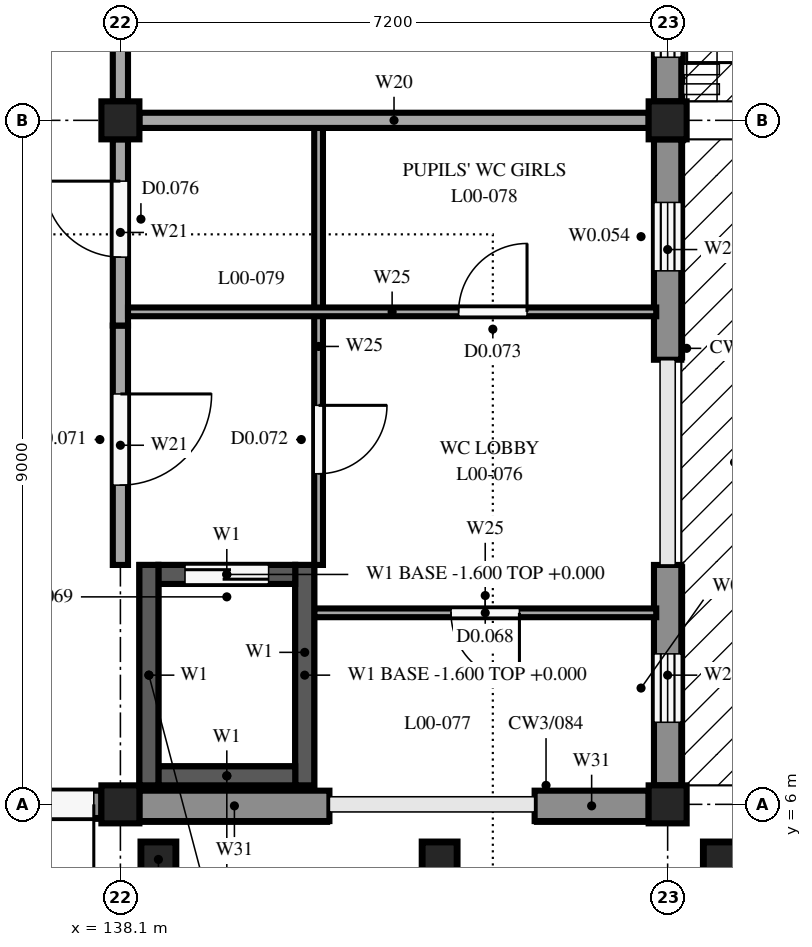
"""IFC4 building model, lengths in metres.
Left out: names, types, materials, properties, quantities, classifications, styles, units other than length and angle.
Written with IfcOpenShell. Run it as: python <this file> out.ifc"""

import sys

from ifc_helpers import new_model, si_unit, direction, frame, frame_2d, origin, origin_2d, place, context, subcontext, project, spatial, rectangle, extrude, element, fill, save


model = new_model("IFC4")
c1 = context("Model", 3, precision=1e-05, world=origin(), true_north=direction((0.0, 1.0)))
c2 = subcontext(c1, "Body", "Model", "MODEL_VIEW")
j1 = project(units=[si_unit("LENGTHUNIT", "METRE"), si_unit("PLANEANGLEUNIT", "RADIAN")], contexts=[c1])
p1 = place(None, origin())
s1 = spatial("IfcSite", under=j1, at=p1, CompositionType="ELEMENT")
p2 = place(p1, origin())
s2 = spatial("IfcBuilding", under=s1, at=p2, CompositionType="ELEMENT")
p3 = place(p2, origin())
s3 = spatial("IfcBuildingStorey", under=s2, at=p3, CompositionType="ELEMENT", Elevation=0.0)
for number, where, z_axis, x_axis in (
    (1, (138.1, 6.0, 0.0), (0.0, 0.0, 1.0), (1.0, 0.0, 0.0)),
    (2, (138.1, 15.0, 0.0), (0.0, 0.0, 1.0), (1.0, 0.0, 0.0)),
    (3, (145.3, 6.0, 0.0), (0.0, 0.0, 1.0), (1.0, 0.0, 0.0)),
    (4, (145.3, 15.0, 0.0), (0.0, 0.0, 1.0), (1.0, 0.0, 0.0)),
):
    element("IfcColumn", number, at=place(p3, frame(where, z_axis=z_axis, x_axis=x_axis)), inside=s3, PredefinedType="COLUMN", context=c2, shape_type="SweptSolid", body=[
        extrude(rectangle(XDim=0.5, YDim=0.5, at=origin_2d()), origin(), (0.0, 0.0, 1.0), 4.25),
    ])
for number, where, z_axis, x_axis in (
    (5, (138.475, 6.25, 0.0), (0.0, 0.0, 1.0), (0.0, 1.0, 0.0)),
    (6, (140.525, 6.25, 0.0), (0.0, 0.0, 1.0), (0.0, 1.0, 0.0)),
):
    element("IfcWall", number, at=place(p3, frame(where, z_axis=z_axis, x_axis=x_axis)), inside=s3, PredefinedType="SHEAR", context=c2, shape_type="SweptSolid", body=[
        extrude(rectangle(XDim=2.9, YDim=0.25, at=frame_2d((1.45, 0.0))), origin(), (0.0, 0.0, 1.0), 4.25),
    ])
p4 = place(p3, frame((138.6, 6.375, 0.0), z_axis=(0.0, 0.0, 1.0), x_axis=(1.0, 0.0, 0.0)))
e7 = element("IfcWall", 7, at=p4, inside=s3, PredefinedType="SHEAR", context=c2, shape_type="SweptSolid", body=[
    extrude(rectangle(XDim=1.8, YDim=0.25, at=frame_2d((0.9, 0.0))), origin(), (0.0, 0.0, 1.0), 4.25),
])
p5 = place(p3, frame((138.6, 9.025, 0.0), z_axis=(0.0, 0.0, 1.0), x_axis=(1.0, 0.0, 0.0)))
e8 = element("IfcWall", 8, at=p5, inside=s3, PredefinedType="SHEAR", context=c2, shape_type="SweptSolid", body=[
    extrude(rectangle(XDim=1.8, YDim=0.25, at=frame_2d((0.9, 0.0))), origin(), (0.0, 0.0, 1.0), 4.25),
])
p6 = place(p5, frame((0.35, 0.0, 0.0)))
e9 = element("IfcOpeningElement", 9, at=p6, cuts=e8, PredefinedType="OPENING", context=c2, shape_type="SweptSolid", body=[
    extrude(rectangle(XDim=1.1, YDim=2.1, at=frame_2d((0.55, 1.05))), frame((0.0, 0.135, 0.0), z_axis=(0.0, -1.0, 0.0), x_axis=(1.0, 0.0, 0.0)), (0.0, 0.0, 1.0), 0.27),
])
for number, where, z_axis, x_axis in (
    (10, (138.475, 6.25, -1.6), (0.0, 0.0, 1.0), (0.0, 1.0, 0.0)),
    (11, (140.525, 6.25, -1.6), (0.0, 0.0, 1.0), (0.0, 1.0, 0.0)),
):
    element("IfcWall", number, at=place(p3, frame(where, z_axis=z_axis, x_axis=x_axis)), inside=s3, PredefinedType="SHEAR", context=c2, shape_type="SweptSolid", body=[
        extrude(rectangle(XDim=2.9, YDim=0.25, at=frame_2d((1.45, 0.0))), origin(), (0.0, 0.0, 1.0), 1.6),
    ])
for number, where, z_axis, x_axis in (
    (12, (138.6, 6.375, -1.6), (0.0, 0.0, 1.0), (1.0, 0.0, 0.0)),
    (13, (138.6, 9.025, -1.6), (0.0, 0.0, 1.0), (1.0, 0.0, 0.0)),
):
    element("IfcWall", number, at=place(p3, frame(where, z_axis=z_axis, x_axis=x_axis)), inside=s3, PredefinedType="SHEAR", context=c2, shape_type="SweptSolid", body=[
        extrude(rectangle(XDim=1.8, YDim=0.25, at=frame_2d((0.9, 0.0))), origin(), (0.0, 0.0, 1.0), 1.6),
    ])
for number, where, z_axis, x_axis in (
    (14, (138.6, 5.275, -0.3), (0.0, 0.0, 1.0), (1.0, 0.0, 0.0)),
    (15, (142.3, 5.275, -0.3), (0.0, 0.0, 1.0), (1.0, 0.0, 0.0)),
    (16, (146.0, 5.275, -0.3), (0.0, 0.0, 1.0), (1.0, 0.0, 0.0)),
):
    element("IfcColumn", number, at=place(p3, frame(where, z_axis=z_axis, x_axis=x_axis)), inside=s3, PredefinedType="COLUMN", context=c2, shape_type="SweptSolid", body=[
        extrude(rectangle(XDim=0.45, YDim=0.45, at=origin_2d()), origin(), (0.0, 0.0, 1.0), 3.95),
    ])
p7 = place(p3, frame((145.3, 9.15, 0.0), z_axis=(0.0, 0.0, 1.0), x_axis=(0.0, -1.0, 0.0)))
e17 = element("IfcWall", 17, at=p7, inside=s3, PredefinedType="STANDARD", context=c2, shape_type="SweptSolid", body=[
    extrude(rectangle(XDim=2.9, YDim=0.36, at=frame_2d((1.45, 0.0))), origin(), (0.0, 0.0, 1.0), 3.75),
])
p8 = place(p7, frame((1.17, 0.0, 1.6)))
e18 = element("IfcOpeningElement", 18, at=p8, cuts=e17, PredefinedType="OPENING", context=c2, shape_type="SweptSolid", body=[
    extrude(rectangle(XDim=0.9, YDim=1.0, at=frame_2d((0.45, 0.5))), frame((0.0, 0.19, 0.0), z_axis=(0.0, -1.0, 0.0), x_axis=(1.0, 0.0, 0.0)), (0.0, 0.0, 1.0), 0.38),
])
p9 = place(p3, frame((145.3, 14.75, 0.0), z_axis=(0.0, 0.0, 1.0), x_axis=(0.0, -1.0, 0.0)))
e19 = element("IfcWall", 19, at=p9, inside=s3, PredefinedType="STANDARD", context=c2, shape_type="SweptSolid", body=[
    extrude(rectangle(XDim=2.9, YDim=0.36, at=frame_2d((1.45, 0.0))), origin(), (0.0, 0.0, 1.0), 3.75),
])
p10 = place(p9, frame((0.83, 0.0, 1.6)))
e20 = element("IfcOpeningElement", 20, at=p10, cuts=e19, PredefinedType="OPENING", context=c2, shape_type="SweptSolid", body=[
    extrude(rectangle(XDim=0.9, YDim=1.0, at=frame_2d((0.45, 0.5))), frame((0.0, 0.19, 0.0), z_axis=(0.0, -1.0, 0.0), x_axis=(1.0, 0.0, 0.0)), (0.0, 0.0, 1.0), 0.38),
])
p11 = place(p3, frame((145.3, 23.75, 0.0), z_axis=(0.0, 0.0, 1.0), x_axis=(0.0, -1.0, 0.0)))
e21 = element("IfcWall", 21, at=p11, inside=s3, PredefinedType="STANDARD", context=c2, shape_type="SweptSolid", body=[
    extrude(rectangle(XDim=8.5, YDim=0.36, at=frame_2d((4.25, 0.0))), origin(), (0.0, 0.0, 1.0), 3.75),
])
p12 = place(p11, frame((6.52, 0.0, 0.9)))
e22 = element("IfcOpeningElement", 22, at=p12, cuts=e21, PredefinedType="OPENING", context=c2, shape_type="SweptSolid", body=[
    extrude(rectangle(XDim=1.4, YDim=2.7, at=frame_2d((0.7, 1.35))), frame((0.0, 0.19, 0.0), z_axis=(0.0, -1.0, 0.0), x_axis=(1.0, 0.0, 0.0)), (0.0, 0.0, 1.0), 0.38),
])
p13 = place(p11, frame((4.54, 0.0, 0.9)))
e23 = element("IfcOpeningElement", 23, at=p13, cuts=e21, PredefinedType="OPENING", context=c2, shape_type="SweptSolid", body=[
    extrude(rectangle(XDim=1.4, YDim=2.7, at=frame_2d((0.7, 1.35))), frame((0.0, 0.19, 0.0), z_axis=(0.0, -1.0, 0.0), x_axis=(1.0, 0.0, 0.0)), (0.0, 0.0, 1.0), 0.38),
])
p14 = place(p11, frame((2.56, 0.0, 0.9)))
e24 = element("IfcOpeningElement", 24, at=p14, cuts=e21, PredefinedType="OPENING", context=c2, shape_type="SweptSolid", body=[
    extrude(rectangle(XDim=1.4, YDim=2.7, at=frame_2d((0.7, 1.35))), frame((0.0, 0.19, 0.0), z_axis=(0.0, -1.0, 0.0), x_axis=(1.0, 0.0, 0.0)), (0.0, 0.0, 1.0), 0.38),
])
p15 = place(p11, frame((0.58, 0.0, 0.9)))
e25 = element("IfcOpeningElement", 25, at=p15, cuts=e21, PredefinedType="OPENING", context=c2, shape_type="SweptSolid", body=[
    extrude(rectangle(XDim=1.4, YDim=2.7, at=frame_2d((0.7, 1.35))), frame((0.0, 0.19, 0.0), z_axis=(0.0, -1.0, 0.0), x_axis=(1.0, 0.0, 0.0)), (0.0, 0.0, 1.0), 0.38),
])
p16 = place(p3, frame((137.85, 6.0, 0.0), z_axis=(0.0, 0.0, 1.0), x_axis=(-1.0, 0.0, 0.0)))
e26 = element("IfcWall", 26, at=p16, inside=s3, PredefinedType="STANDARD", context=c2, shape_type="SweptSolid", body=[
    extrude(rectangle(XDim=2.2, YDim=0.36, at=frame_2d((1.1, 0.0))), origin(), (0.0, 0.0, 1.0), 3.9),
])
p17 = place(p16, frame((0.1, 0.0, 0.0)))
e27 = element("IfcOpeningElement", 27, at=p17, cuts=e26, PredefinedType="OPENING", context=c2, shape_type="SweptSolid", body=[
    extrude(rectangle(XDim=2.0, YDim=2.4, at=frame_2d((1.0, 1.2))), frame((0.0, 0.19, 0.0), z_axis=(0.0, -1.0, 0.0), x_axis=(1.0, 0.0, 0.0)), (0.0, 0.0, 1.0), 0.38),
])
p18 = place(p3, frame((140.85, 5.98, 0.0), z_axis=(0.0, 0.0, 1.0), x_axis=(-1.0, 0.0, 0.0)))
e28 = element("IfcWall", 28, at=p18, inside=s3, PredefinedType="STANDARD", context=c2, shape_type="SweptSolid", body=[
    extrude(rectangle(XDim=2.5, YDim=0.4, at=frame_2d((1.25, 0.0))), origin(), (0.0, 0.0, 1.0), 3.8),
])
p19 = place(p3, frame((145.05, 5.98, 0.0), z_axis=(0.0, 0.0, 1.0), x_axis=(-1.0, 0.0, 0.0)))
e29 = element("IfcWall", 29, at=p19, inside=s3, PredefinedType="STANDARD", context=c2, shape_type="SweptSolid", body=[
    extrude(rectangle(XDim=1.5, YDim=0.4, at=frame_2d((0.75, 0.0))), origin(), (0.0, 0.0, 1.0), 3.8),
])
p20 = place(p3, frame((138.1, 12.3, 0.0), z_axis=(0.0, 0.0, 1.0), x_axis=(0.0, -1.0, 0.0)))
e30 = element("IfcWall", 30, at=p20, inside=s3, PredefinedType="PARTITIONING", context=c2, shape_type="SweptSolid", body=[
    extrude(rectangle(XDim=3.15, YDim=0.2, at=frame_2d((1.575, 0.0))), origin(), (0.0, 0.0, 1.0), 3.8),
])
p21 = place(p20, frame((0.9, 0.0, 0.0)))
e31 = element("IfcOpeningElement", 31, at=p21, cuts=e30, PredefinedType="OPENING", context=c2, shape_type="SweptSolid", body=[
    extrude(rectangle(XDim=1.2, YDim=2.1, at=frame_2d((0.6, 1.05))), frame((0.0, 0.11, 0.0), z_axis=(0.0, -1.0, 0.0), x_axis=(1.0, 0.0, 0.0)), (0.0, 0.0, 1.0), 0.22),
])
p22 = place(p3, frame((138.1, 12.3, 0.0), z_axis=(0.0, 0.0, 1.0), x_axis=(0.0, 1.0, 0.0)))
e32 = element("IfcWall", 32, at=p22, inside=s3, PredefinedType="PARTITIONING", context=c2, shape_type="SweptSolid", body=[
    extrude(rectangle(XDim=2.45, YDim=0.2, at=frame_2d((1.225, 0.0))), origin(), (0.0, 0.0, 1.0), 3.8),
])
p23 = place(p22, frame((0.9, 0.0, 0.0)))
e33 = element("IfcOpeningElement", 33, at=p23, cuts=e32, PredefinedType="OPENING", context=c2, shape_type="SweptSolid", body=[
    extrude(rectangle(XDim=1.0, YDim=2.1, at=frame_2d((0.5, 1.05))), frame((0.0, 0.11, 0.0), z_axis=(0.0, -1.0, 0.0), x_axis=(1.0, 0.0, 0.0)), (0.0, 0.0, 1.0), 0.22),
])
p24 = place(p3, frame((138.35, 15.0, 0.0), z_axis=(0.0, 0.0, 1.0), x_axis=(1.0, 0.0, 0.0)))
e34 = element("IfcWall", 34, at=p24, inside=s3, PredefinedType="PARTITIONING", context=c2, shape_type="SweptSolid", body=[
    extrude(rectangle(XDim=6.7, YDim=0.2, at=frame_2d((3.35, 0.0))), origin(), (0.0, 0.0, 1.0), 3.8),
])
p25 = place(p3, frame((140.708, 14.9, 0.0), z_axis=(0.0, 0.0, 1.0), x_axis=(0.0, -1.0, 0.0)))
e35 = element("IfcWall", 35, at=p25, inside=s3, PredefinedType="PARTITIONING", context=c2, shape_type="SweptSolid", body=[
    extrude(rectangle(XDim=5.75, YDim=0.115, at=frame_2d((2.875, 0.0))), origin(), (0.0, 0.0, 1.0), 4.25),
])
p26 = place(p25, frame((3.65, 0.0, 0.0)))
e36 = element("IfcOpeningElement", 36, at=p26, cuts=e35, PredefinedType="OPENING", context=c2, shape_type="SweptSolid", body=[
    extrude(rectangle(XDim=0.9, YDim=2.1, at=frame_2d((0.45, 1.05))), frame((0.0, 0.067, 0.0), z_axis=(0.0, -1.0, 0.0), x_axis=(1.0, 0.0, 0.0)), (0.0, 0.0, 1.0), 0.135),
])
p27 = place(p3, frame((145.15, 8.52, 0.0), z_axis=(0.0, 0.0, 1.0), x_axis=(-1.0, 0.0, 0.0)))
e37 = element("IfcWall", 37, at=p27, inside=s3, PredefinedType="PARTITIONING", context=c2, shape_type="SweptSolid", body=[
    extrude(rectangle(XDim=4.5, YDim=0.115, at=frame_2d((2.25, 0.0))), origin(), (0.0, 0.0, 1.0), 4.25),
])
p28 = place(p27, frame((1.8, 0.0, 0.0)))
e38 = element("IfcOpeningElement", 38, at=p28, cuts=e37, PredefinedType="OPENING", context=c2, shape_type="SweptSolid", body=[
    extrude(rectangle(XDim=0.9, YDim=2.1, at=frame_2d((0.45, 1.05))), frame((0.0, 0.067, 0.0), z_axis=(0.0, -1.0, 0.0), x_axis=(1.0, 0.0, 0.0)), (0.0, 0.0, 1.0), 0.135),
])
p29 = place(p3, frame((138.2, 12.48, 0.0), z_axis=(0.0, 0.0, 1.0), x_axis=(1.0, 0.0, 0.0)))
e39 = element("IfcWall", 39, at=p29, inside=s3, PredefinedType="PARTITIONING", context=c2, shape_type="SweptSolid", body=[
    extrude(rectangle(XDim=6.95, YDim=0.115, at=frame_2d((3.475, 0.0))), origin(), (0.0, 0.0, 1.0), 4.25),
])
p30 = place(p29, frame((4.35, 0.0, 0.0)))
e40 = element("IfcOpeningElement", 40, at=p30, cuts=e39, PredefinedType="OPENING", context=c2, shape_type="SweptSolid", body=[
    extrude(rectangle(XDim=0.9, YDim=2.1, at=frame_2d((0.45, 1.05))), frame((0.0, 0.067, 0.0), z_axis=(0.0, -1.0, 0.0), x_axis=(1.0, 0.0, 0.0)), (0.0, 0.0, 1.0), 0.135),
])
p31 = place(p3, frame((138.1, 23.75, 0.0), z_axis=(0.0, 0.0, 1.0), x_axis=(0.0, -1.0, 0.0)))
e41 = element("IfcWall", 41, at=p31, inside=s3, PredefinedType="PARTITIONING", context=c2, shape_type="SweptSolid", body=[
    extrude(rectangle(XDim=8.5, YDim=0.2, at=frame_2d((4.25, 0.0))), origin(), (0.0, 0.0, 1.0), 3.8),
])
p32 = place(p31, frame((3.75, 0.0, 0.0)))
e42 = element("IfcOpeningElement", 42, at=p32, cuts=e41, PredefinedType="OPENING", context=c2, shape_type="SweptSolid", body=[
    extrude(rectangle(XDim=1.0, YDim=2.1, at=frame_2d((0.5, 1.05))), frame((0.0, 0.11, 0.0), z_axis=(0.0, -1.0, 0.0), x_axis=(1.0, 0.0, 0.0)), (0.0, 0.0, 1.0), 0.22),
])
p33 = place(p8, origin())
e43 = element("IfcWindow", 43, at=p33, inside=s3, PartitioningType="SINGLE_PANEL", PredefinedType="WINDOW", context=c2, shape_type="SweptSolid", body=[
    extrude(rectangle(XDim=0.9, YDim=1.0, at=frame_2d((0.45, 0.5))), frame((0.0, 0.03, 0.0), z_axis=(0.0, -1.0, 0.0), x_axis=(1.0, 0.0, 0.0)), (0.0, 0.0, 1.0), 0.06),
])
fill(e18, e43)
p34 = place(p10, origin())
e44 = element("IfcWindow", 44, at=p34, inside=s3, PartitioningType="SINGLE_PANEL", PredefinedType="WINDOW", context=c2, shape_type="SweptSolid", body=[
    extrude(rectangle(XDim=0.9, YDim=1.0, at=frame_2d((0.45, 0.5))), frame((0.0, 0.03, 0.0), z_axis=(0.0, -1.0, 0.0), x_axis=(1.0, 0.0, 0.0)), (0.0, 0.0, 1.0), 0.06),
])
fill(e20, e44)
p35 = place(p12, origin())
e45 = element("IfcWindow", 45, at=p35, inside=s3, PartitioningType="DOUBLE_PANEL_VERTICAL", PredefinedType="WINDOW", context=c2, shape_type="SweptSolid", body=[
    extrude(rectangle(XDim=1.4, YDim=2.7, at=frame_2d((0.7, 1.35))), frame((0.0, 0.03, 0.0), z_axis=(0.0, -1.0, 0.0), x_axis=(1.0, 0.0, 0.0)), (0.0, 0.0, 1.0), 0.06),
])
fill(e22, e45)
p36 = place(p17, origin())
e46 = element("IfcDoor", 46, at=p36, inside=s3, OperationType="DOUBLE_DOOR_SINGLE_SWING", PredefinedType="DOOR", context=c2, shape_type="SweptSolid", body=[
    extrude(rectangle(XDim=2.0, YDim=2.4, at=frame_2d((1.0, 1.2))), frame((0.0, 0.025, 0.0), z_axis=(0.0, -1.0, 0.0), x_axis=(1.0, 0.0, 0.0)), (0.0, 0.0, 1.0), 0.05),
])
fill(e27, e46)
p37 = place(p21, origin())
e47 = element("IfcDoor", 47, at=p37, inside=s3, OperationType="SINGLE_SWING_LEFT", PredefinedType="DOOR", context=c2, shape_type="SweptSolid", body=[
    extrude(rectangle(XDim=1.2, YDim=2.1, at=frame_2d((0.6, 1.05))), frame((0.0, 0.025, 0.0), z_axis=(0.0, -1.0, 0.0), x_axis=(1.0, 0.0, 0.0)), (0.0, 0.0, 1.0), 0.05),
])
fill(e31, e47)
p38 = place(p23, origin())
e48 = element("IfcDoor", 48, at=p38, inside=s3, OperationType="SINGLE_SWING_RIGHT", PredefinedType="DOOR", context=c2, shape_type="SweptSolid", body=[
    extrude(rectangle(XDim=1.0, YDim=2.1, at=frame_2d((0.5, 1.05))), frame((0.0, 0.025, 0.0), z_axis=(0.0, -1.0, 0.0), x_axis=(1.0, 0.0, 0.0)), (0.0, 0.0, 1.0), 0.05),
])
fill(e33, e48)
p39 = place(p26, origin())
e49 = element("IfcDoor", 49, at=p39, inside=s3, OperationType="SINGLE_SWING_LEFT", PredefinedType="DOOR", context=c2, shape_type="SweptSolid", body=[
    extrude(rectangle(XDim=0.9, YDim=2.1, at=frame_2d((0.45, 1.05))), frame((0.0, 0.025, 0.0), z_axis=(0.0, -1.0, 0.0), x_axis=(1.0, 0.0, 0.0)), (0.0, 0.0, 1.0), 0.05),
])
fill(e36, e49)
p40 = place(p28, origin())
e50 = element("IfcDoor", 50, at=p40, inside=s3, OperationType="SINGLE_SWING_LEFT", PredefinedType="DOOR", context=c2, shape_type="SweptSolid", body=[
    extrude(rectangle(XDim=0.9, YDim=2.1, at=frame_2d((0.45, 1.05))), frame((0.0, 0.025, 0.0), z_axis=(0.0, -1.0, 0.0), x_axis=(1.0, 0.0, 0.0)), (0.0, 0.0, 1.0), 0.05),
])
fill(e38, e50)
p41 = place(p30, origin())
e51 = element("IfcDoor", 51, at=p41, inside=s3, OperationType="SINGLE_SWING_RIGHT", PredefinedType="DOOR", context=c2, shape_type="SweptSolid", body=[
    extrude(rectangle(XDim=0.9, YDim=2.1, at=frame_2d((0.45, 1.05))), frame((0.0, 0.025, 0.0), z_axis=(0.0, -1.0, 0.0), x_axis=(1.0, 0.0, 0.0)), (0.0, 0.0, 1.0), 0.05),
])
fill(e40, e51)
p42 = place(p6, origin())
e52 = element("IfcDoor", 52, at=p42, inside=s3, OperationType="SLIDING_TO_LEFT", PredefinedType="DOOR", context=c2, shape_type="SweptSolid", body=[
    extrude(rectangle(XDim=1.1, YDim=2.1, at=frame_2d((0.55, 1.05))), frame((0.0, 0.025, 0.0), z_axis=(0.0, -1.0, 0.0), x_axis=(1.0, 0.0, 0.0)), (0.0, 0.0, 1.0), 0.05),
])
fill(e9, e52)
save(model, sys.argv[1])
